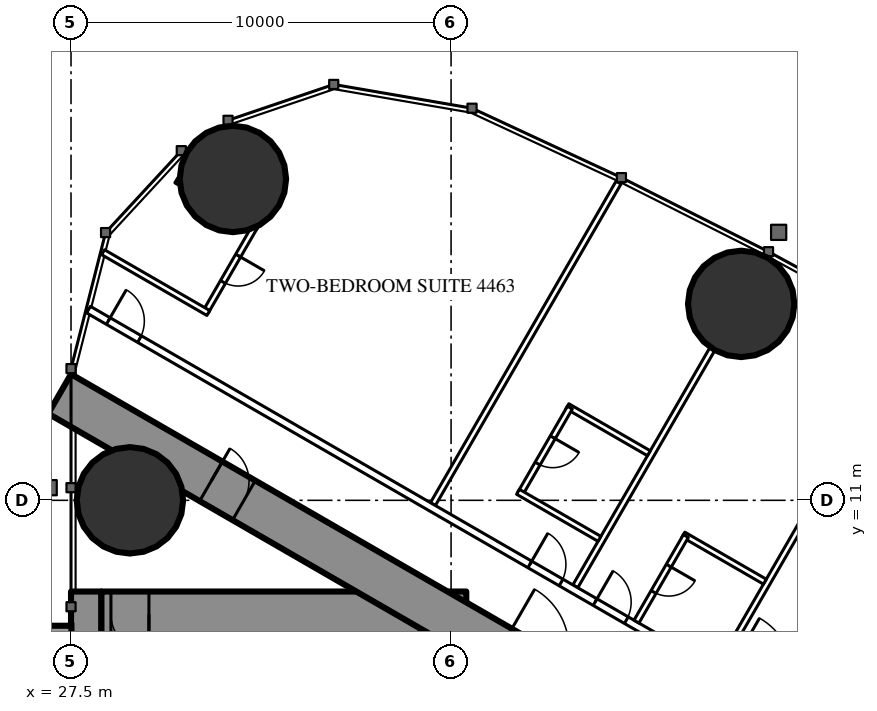
"""IFC4 building model, lengths in metres.
Left out: names, types, materials, properties, quantities, classifications, styles, units other than length and angle.
Written with IfcOpenShell. Run it as: python <this file> out.ifc"""

import sys

from ifc_helpers import new_model, si_unit, direction, frame, frame_2d, origin, origin_2d, place, context, subcontext, project, spatial, rectangle, circle, extrude, element, fill, save


model = new_model("IFC4")
c1 = context("Model", 3, precision=1e-05, world=origin(), true_north=direction((0.0, 1.0)))
c2 = subcontext(c1, "Body", "Model", "MODEL_VIEW")
j1 = project(units=[si_unit("LENGTHUNIT", "METRE"), si_unit("PLANEANGLEUNIT", "RADIAN")], contexts=[c1])
p1 = place(None, origin())
s1 = spatial("IfcSite", under=j1, at=p1, CompositionType="ELEMENT")
p2 = place(p1, origin())
s2 = spatial("IfcBuilding", under=s1, at=p2, CompositionType="ELEMENT")
p3 = place(p2, frame((0.0, 0.0, 166.8)))
s3 = spatial("IfcBuildingStorey", under=s2, at=p3, CompositionType="ELEMENT", Elevation=166.8)
for number, where, z_axis, x_axis in (
    (1, (31.76, 19.456, 0.0), (0.0, 0.0, 1.0), (1.0, 0.0, 0.0)),
    (2, (29.05, 11.0, 0.0), (0.0, 0.0, 1.0), (1.0, 0.0, 0.0)),
    (3, (45.134, 16.168, 0.0), (0.0, 0.0, 1.0), (1.0, 0.0, 0.0)),
):
    element("IfcColumn", number, at=place(p3, frame(where, z_axis=z_axis, x_axis=x_axis)), inside=s3, PredefinedType="COLUMN", context=c2, shape_type="SweptSolid", body=[
        extrude(circle(Radius=1.4, at=origin_2d()), origin(), (0.0, 0.0, 1.0), 3.5),
    ])
p4 = place(p3, frame((27.9, -8.6, 0.0), z_axis=(0.0, 0.0, 1.0), x_axis=(0.0, 1.0, 0.0)))
e4 = element("IfcWall", 4, at=p4, inside=s3, PredefinedType="SHEAR", context=c2, shape_type="SweptSolid", body=[
    extrude(rectangle(XDim=17.2, YDim=0.8, at=frame_2d((8.6, 0.0))), origin(), (0.0, 0.0, 1.0), 3.5),
])
p5 = place(p4, frame((2.45, 0.0, 0.6)))
e5 = element("IfcOpeningElement", 5, at=p5, cuts=e4, PredefinedType="OPENING", context=c2, shape_type="SweptSolid", body=[
    extrude(rectangle(XDim=0.6, YDim=2.1, at=frame_2d((0.3, 1.05))), frame((0.0, 0.41, 0.0), z_axis=(0.0, -1.0, 0.0), x_axis=(1.0, 0.0, 0.0)), (0.0, 0.0, 1.0), 0.82),
])
p6 = place(p4, frame((14.15, 0.0, 0.6)))
e6 = element("IfcOpeningElement", 6, at=p6, cuts=e4, PredefinedType="OPENING", context=c2, shape_type="SweptSolid", body=[
    extrude(rectangle(XDim=0.6, YDim=2.1, at=frame_2d((0.3, 1.05))), frame((0.0, 0.41, 0.0), z_axis=(0.0, -1.0, 0.0), x_axis=(1.0, 0.0, 0.0)), (0.0, 0.0, 1.0), 0.82),
])
p7 = place(p3, frame((37.3, -8.6, 0.0), z_axis=(0.0, 0.0, 1.0), x_axis=(0.0, 1.0, 0.0)))
e7 = element("IfcWall", 7, at=p7, inside=s3, PredefinedType="SHEAR", context=c2, shape_type="SweptSolid", body=[
    extrude(rectangle(XDim=17.2, YDim=1.2, at=frame_2d((8.6, 0.0))), origin(), (0.0, 0.0, 1.0), 3.5),
])
p8 = place(p7, frame((7.7, 0.0, 0.0)))
e8 = element("IfcOpeningElement", 8, at=p8, cuts=e7, PredefinedType="OPENING", context=c2, shape_type="SweptSolid", body=[
    extrude(rectangle(XDim=1.8, YDim=2.2, at=frame_2d((0.9, 1.1))), frame((0.0, 0.61, 0.0), z_axis=(0.0, -1.0, 0.0), x_axis=(1.0, 0.0, 0.0)), (0.0, 0.0, 1.0), 1.22),
])
p9 = place(p3, frame((28.3, 8.0, 0.0), z_axis=(0.0, 0.0, 1.0), x_axis=(1.0, 0.0, 0.0)))
e9 = element("IfcWall", 9, at=p9, inside=s3, PredefinedType="SHEAR", context=c2, shape_type="SweptSolid", body=[
    extrude(rectangle(XDim=8.4, YDim=1.2, at=frame_2d((4.2, 0.0))), origin(), (0.0, 0.0, 1.0), 3.5),
])
p10 = place(p9, frame((0.25, 0.0, 0.0)))
e10 = element("IfcOpeningElement", 10, at=p10, cuts=e9, PredefinedType="OPENING", context=c2, shape_type="SweptSolid", body=[
    extrude(rectangle(XDim=1.0, YDim=2.2, at=frame_2d((0.5, 1.1))), frame((0.0, 0.61, 0.0), z_axis=(0.0, -1.0, 0.0), x_axis=(1.0, 0.0, 0.0)), (0.0, 0.0, 1.0), 1.22),
])
p11 = place(p3, frame((27.2, 13.8, 0.0), z_axis=(0.0, 0.0, 1.0), x_axis=(0.866024515034, -0.500001539357, 0.0)))
e11 = element("IfcWall", 11, at=p11, inside=s3, PredefinedType="SHEAR", context=c2, shape_type="SweptSolid", body=[
    extrude(rectangle(XDim=26.907, YDim=1.2, at=frame_2d((13.454, 0.0))), origin(), (0.0, 0.0, 1.0), 3.5),
])
p12 = place(p11, frame((4.6, 0.0, 0.0)))
e12 = element("IfcOpeningElement", 12, at=p12, cuts=e11, PredefinedType="OPENING", context=c2, shape_type="SweptSolid", body=[
    extrude(rectangle(XDim=1.0, YDim=2.2, at=frame_2d((0.5, 1.1))), frame((0.0, 0.61, 0.0), z_axis=(0.0, -1.0, 0.0), x_axis=(1.0, 0.0, 0.0)), (0.0, 0.0, 1.0), 1.22),
])
p13 = place(p11, frame((13.395, 0.0, 0.0)))
e13 = element("IfcOpeningElement", 13, at=p13, cuts=e11, PredefinedType="OPENING", context=c2, shape_type="SweptSolid", body=[
    extrude(rectangle(XDim=1.8, YDim=2.2, at=frame_2d((0.9, 1.1))), frame((0.0, 0.61, 0.0), z_axis=(0.0, -1.0, 0.0), x_axis=(1.0, 0.0, 0.0)), (0.0, 0.0, 1.0), 1.22),
])
p14 = place(p3, frame((37.022, 10.9, 0.0), z_axis=(0.0, 0.0, 1.0), x_axis=(0.499998620953, 0.866026199976, 0.0)))
e14 = element("IfcWall", 14, at=p14, inside=s3, PredefinedType="PARTITIONING", context=c2, shape_type="SweptSolid", body=[
    extrude(rectangle(XDim=9.77, YDim=0.15, at=frame_2d((4.885, 0.0))), origin(), (0.0, 0.0, 1.0), 3.25),
])
p15 = place(p3, frame((40.769, 8.737, 0.0), z_axis=(0.0, 0.0, 1.0), x_axis=(0.500013115284, 0.866017831539, 0.0)))
e15 = element("IfcWall", 15, at=p15, inside=s3, PredefinedType="PARTITIONING", context=c2, shape_type="SweptSolid", body=[
    extrude(rectangle(XDim=7.198, YDim=0.15, at=frame_2d((3.599, 0.0))), origin(), (0.0, 0.0, 1.0), 2.3),
])
p16 = place(p3, frame((44.521, 6.571, 0.0), z_axis=(0.0, 0.0, 1.0), x_axis=(0.500020376429, 0.866013639128, 0.0)))
e16 = element("IfcWall", 16, at=p16, inside=s3, PredefinedType="PARTITIONING", context=c2, shape_type="SweptSolid", body=[
    extrude(rectangle(XDim=7.306, YDim=0.15, at=frame_2d((3.653, 0.0))), origin(), (0.0, 0.0, 1.0), 2.3),
])
p17 = place(p3, frame((27.959, 16.017, 0.0), z_axis=(0.0, 0.0, 1.0), x_axis=(0.866027146794, -0.499996981007, 0.0)))
e17 = element("IfcWall", 17, at=p17, inside=s3, PredefinedType="PARTITIONING", context=c2, shape_type="SweptSolid", body=[
    extrude(rectangle(XDim=21.657, YDim=0.2, at=frame_2d((10.829, 0.0))), origin(), (0.0, 0.0, 1.0), 3.25),
])
p18 = place(p17, frame((15.391, 0.0, 0.0)))
e18 = element("IfcOpeningElement", 18, at=p18, cuts=e17, PredefinedType="OPENING", context=c2, shape_type="SweptSolid", body=[
    extrude(rectangle(XDim=0.95, YDim=2.2, at=frame_2d((0.475, 1.1))), frame((0.0, 0.11, 0.0), z_axis=(0.0, -1.0, 0.0), x_axis=(1.0, 0.0, 0.0)), (0.0, 0.0, 1.0), 0.22),
])
p19 = place(p17, frame((13.409, 0.0, 0.0)))
e19 = element("IfcOpeningElement", 19, at=p19, cuts=e17, PredefinedType="OPENING", context=c2, shape_type="SweptSolid", body=[
    extrude(rectangle(XDim=0.95, YDim=2.2, at=frame_2d((0.475, 1.1))), frame((0.0, 0.11, 0.0), z_axis=(0.0, -1.0, 0.0), x_axis=(1.0, 0.0, 0.0)), (0.0, 0.0, 1.0), 0.22),
])
p20 = place(p17, frame((0.6, 0.0, 0.0)))
e20 = element("IfcOpeningElement", 20, at=p20, cuts=e17, PredefinedType="OPENING", context=c2, shape_type="SweptSolid", body=[
    extrude(rectangle(XDim=0.95, YDim=2.2, at=frame_2d((0.475, 1.1))), frame((0.0, 0.11, 0.0), z_axis=(0.0, -1.0, 0.0), x_axis=(1.0, 0.0, 0.0)), (0.0, 0.0, 1.0), 0.22),
])
p21 = place(p17, frame((19.349, 0.0, 0.0)))
e21 = element("IfcOpeningElement", 21, at=p21, cuts=e17, PredefinedType="OPENING", context=c2, shape_type="SweptSolid", body=[
    extrude(rectangle(XDim=1.8, YDim=2.2, at=frame_2d((0.9, 1.1))), frame((0.0, 0.11, 0.0), z_axis=(0.0, -1.0, 0.0), x_axis=(1.0, 0.0, 0.0)), (0.0, 0.0, 1.0), 0.22),
])
p22 = place(p3, frame((43.613, 10.097, 0.0), z_axis=(0.0, 0.0, 1.0), x_axis=(0.866031185235, -0.4999899861, 0.0)))
e22 = element("IfcWall", 22, at=p22, inside=s3, PredefinedType="PARTITIONING", context=c2, shape_type="SweptSolid", body=[
    extrude(rectangle(XDim=2.475, YDim=0.15, at=frame_2d((1.238, 0.0))), origin(), (0.0, 0.0, 1.0), 3.25),
])
p23 = place(p3, frame((42.378, 7.808, 0.0), z_axis=(0.0, 0.0, 1.0), x_axis=(0.500006934395, 0.866021400173, 0.0)))
e23 = element("IfcWall", 23, at=p23, inside=s3, PredefinedType="PARTITIONING", context=c2, shape_type="SweptSolid", body=[
    extrude(rectangle(XDim=2.6, YDim=0.15, at=frame_2d((1.3, 0.0))), origin(), (0.0, 0.0, 1.0), 3.25),
])
p24 = place(p23, frame((0.9, 0.0, 0.0)))
e24 = element("IfcOpeningElement", 24, at=p24, cuts=e23, PredefinedType="OPENING", context=c2, shape_type="SweptSolid", body=[
    extrude(rectangle(XDim=0.8, YDim=2.2, at=frame_2d((0.4, 1.1))), frame((0.0, 0.085, 0.0), z_axis=(0.0, -1.0, 0.0), x_axis=(1.0, 0.0, 0.0)), (0.0, 0.0, 1.0), 0.17),
])
p25 = place(p3, frame((40.561, 13.476, 0.0), z_axis=(0.0, 0.0, 1.0), x_axis=(0.866006523861, -0.500032699561, 0.0)))
e25 = element("IfcWall", 25, at=p25, inside=s3, PredefinedType="PARTITIONING", context=c2, shape_type="SweptSolid", body=[
    extrude(rectangle(XDim=2.475, YDim=0.15, at=frame_2d((1.237, 0.0))), origin(), (0.0, 0.0, 1.0), 3.25),
])
p26 = place(p3, frame((39.326, 11.187, 0.0), z_axis=(0.0, 0.0, 1.0), x_axis=(0.500047596559, 0.865997922154, 0.0)))
e26 = element("IfcWall", 26, at=p26, inside=s3, PredefinedType="PARTITIONING", context=c2, shape_type="SweptSolid", body=[
    extrude(rectangle(XDim=2.6, YDim=0.15, at=frame_2d((1.3, 0.0))), origin(), (0.0, 0.0, 1.0), 3.25),
])
p27 = place(p26, frame((0.9, 0.0, 0.0)))
e27 = element("IfcOpeningElement", 27, at=p27, cuts=e26, PredefinedType="OPENING", context=c2, shape_type="SweptSolid", body=[
    extrude(rectangle(XDim=0.8, YDim=2.2, at=frame_2d((0.4, 1.1))), frame((0.0, 0.085, 0.0), z_axis=(0.0, -1.0, 0.0), x_axis=(1.0, 0.0, 0.0)), (0.0, 0.0, 1.0), 0.17),
])
for number, where, z_axis, x_axis in (
    (28, (39.261, 11.224, 0.0), (0.0, 0.0, 1.0), (0.866, -0.5, 0.0)),
    (29, (30.269, 19.418, 0.0), (0.0, 0.0, 1.0), (0.866, -0.5, 0.0)),
):
    element("IfcWall", number, at=place(p3, frame(where, z_axis=z_axis, x_axis=x_axis)), inside=s3, PredefinedType="PARTITIONING", context=c2, shape_type="SweptSolid", body=[
        extrude(rectangle(XDim=2.475, YDim=0.15, at=frame_2d((1.237, 0.0))), origin(), (0.0, 0.0, 1.0), 3.25),
    ])
p28 = place(p3, frame((31.048, 15.966, 0.0), z_axis=(0.0, 0.0, 1.0), x_axis=(0.499936506574, 0.866062058628, 0.0)))
e30 = element("IfcWall", 30, at=p28, inside=s3, PredefinedType="PARTITIONING", context=c2, shape_type="SweptSolid", body=[
    extrude(rectangle(XDim=2.6, YDim=0.15, at=frame_2d((1.3, 0.0))), origin(), (0.0, 0.0, 1.0), 2.3),
])
p29 = place(p28, frame((0.9, 0.0, 0.0)))
e31 = element("IfcOpeningElement", 31, at=p29, cuts=e30, PredefinedType="OPENING", context=c2, shape_type="SweptSolid", body=[
    extrude(rectangle(XDim=0.8, YDim=2.2, at=frame_2d((0.4, 1.1))), frame((0.0, 0.085, 0.0), z_axis=(0.0, -1.0, 0.0), x_axis=(1.0, 0.0, 0.0)), (0.0, 0.0, 1.0), 0.17),
])
p30 = place(p3, frame((28.343, 17.528, 0.0), z_axis=(0.0, 0.0, 1.0), x_axis=(0.86600760081, -0.500030834389, 0.0)))
e32 = element("IfcWall", 32, at=p30, inside=s3, PredefinedType="PARTITIONING", context=c2, shape_type="SweptSolid", body=[
    extrude(rectangle(XDim=3.198, YDim=0.15, at=frame_2d((1.599, 0.0))), origin(), (0.0, 0.0, 1.0), 3.25),
])
p31 = place(p24, origin())
e33 = element("IfcDoor", 33, at=p31, inside=s3, OperationType="SINGLE_SWING_RIGHT", PredefinedType="DOOR", context=c2, shape_type="SweptSolid", body=[
    extrude(rectangle(XDim=0.8, YDim=2.2, at=frame_2d((0.4, 1.1))), frame((0.0, 0.025, 0.0), z_axis=(0.0, -1.0, 0.0), x_axis=(1.0, 0.0, 0.0)), (0.0, 0.0, 1.0), 0.05),
])
fill(e24, e33)
p32 = place(p18, origin())
e34 = element("IfcDoor", 34, at=p32, inside=s3, OperationType="SINGLE_SWING_LEFT", PredefinedType="DOOR", context=c2, shape_type="SweptSolid", body=[
    extrude(rectangle(XDim=0.95, YDim=2.2, at=frame_2d((0.475, 1.1))), frame((0.0, 0.025, 0.0), z_axis=(0.0, -1.0, 0.0), x_axis=(1.0, 0.0, 0.0)), (0.0, 0.0, 1.0), 0.05),
])
fill(e18, e34)
p33 = place(p27, origin())
e35 = element("IfcDoor", 35, at=p33, inside=s3, OperationType="SINGLE_SWING_RIGHT", PredefinedType="DOOR", context=c2, shape_type="SweptSolid", body=[
    extrude(rectangle(XDim=0.8, YDim=2.2, at=frame_2d((0.4, 1.1))), frame((0.0, 0.025, 0.0), z_axis=(0.0, -1.0, 0.0), x_axis=(1.0, 0.0, 0.0)), (0.0, 0.0, 1.0), 0.05),
])
fill(e27, e35)
p34 = place(p19, origin())
e36 = element("IfcDoor", 36, at=p34, inside=s3, OperationType="SINGLE_SWING_LEFT", PredefinedType="DOOR", context=c2, shape_type="SweptSolid", body=[
    extrude(rectangle(XDim=0.95, YDim=2.2, at=frame_2d((0.475, 1.1))), frame((0.0, 0.025, 0.0), z_axis=(0.0, -1.0, 0.0), x_axis=(1.0, 0.0, 0.0)), (0.0, 0.0, 1.0), 0.05),
])
fill(e19, e36)
p35 = place(p29, origin())
e37 = element("IfcDoor", 37, at=p35, inside=s3, OperationType="SINGLE_SWING_RIGHT", PredefinedType="DOOR", context=c2, shape_type="SweptSolid", body=[
    extrude(rectangle(XDim=0.8, YDim=2.2, at=frame_2d((0.4, 1.1))), frame((0.0, 0.025, 0.0), z_axis=(0.0, -1.0, 0.0), x_axis=(1.0, 0.0, 0.0)), (0.0, 0.0, 1.0), 0.05),
])
fill(e31, e37)
p36 = place(p20, origin())
e38 = element("IfcDoor", 38, at=p36, inside=s3, OperationType="SINGLE_SWING_LEFT", PredefinedType="DOOR", context=c2, shape_type="SweptSolid", body=[
    extrude(rectangle(XDim=0.95, YDim=2.2, at=frame_2d((0.475, 1.1))), frame((0.0, 0.025, 0.0), z_axis=(0.0, -1.0, 0.0), x_axis=(1.0, 0.0, 0.0)), (0.0, 0.0, 1.0), 0.05),
])
fill(e20, e38)
p37 = place(p12, origin())
e39 = element("IfcDoor", 39, at=p37, inside=s3, OperationType="SINGLE_SWING_LEFT", PredefinedType="DOOR", context=c2, shape_type="SweptSolid", body=[
    extrude(rectangle(XDim=1.0, YDim=2.2, at=frame_2d((0.5, 1.1))), frame((0.0, 0.025, 0.0), z_axis=(0.0, -1.0, 0.0), x_axis=(1.0, 0.0, 0.0)), (0.0, 0.0, 1.0), 0.05),
])
fill(e12, e39)
p38 = place(p10, origin())
e40 = element("IfcDoor", 40, at=p38, inside=s3, OperationType="SINGLE_SWING_RIGHT", PredefinedType="DOOR", context=c2, shape_type="SweptSolid", body=[
    extrude(rectangle(XDim=1.0, YDim=2.2, at=frame_2d((0.5, 1.1))), frame((0.0, 0.025, 0.0), z_axis=(0.0, -1.0, 0.0), x_axis=(1.0, 0.0, 0.0)), (0.0, 0.0, 1.0), 0.05),
])
fill(e10, e40)
save(model, sys.argv[1])
